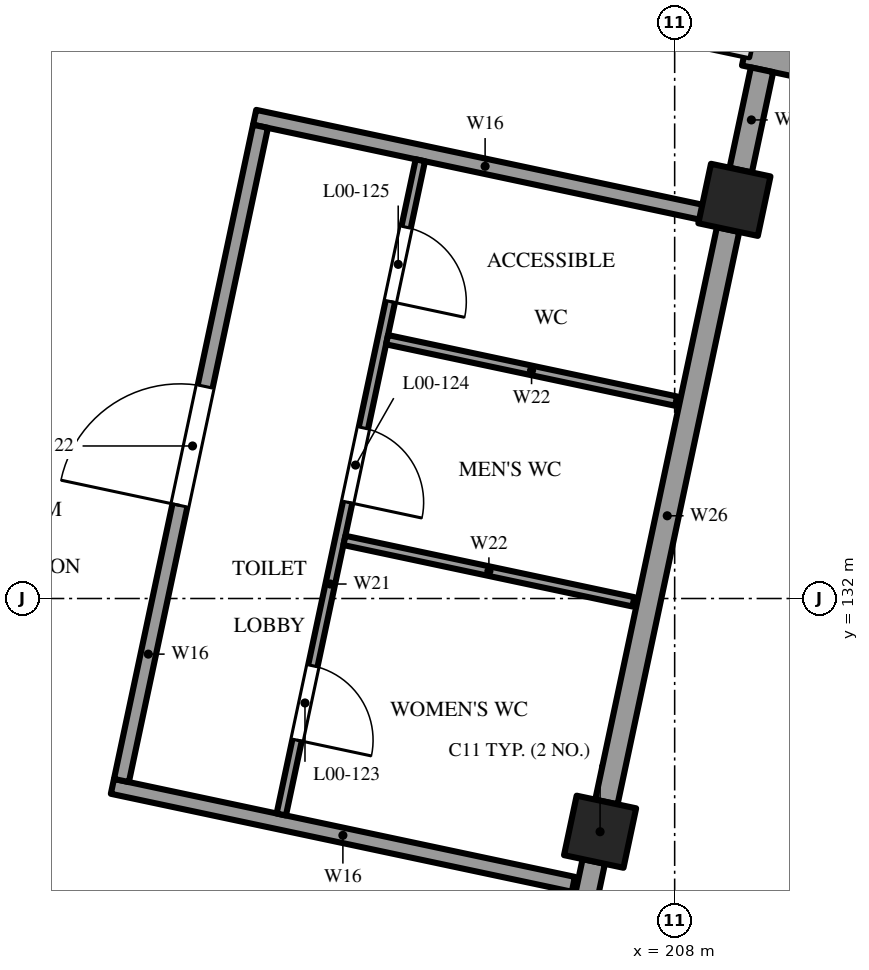
"""IFC4 building model, lengths in metres.
Left out: names, types, materials, properties, quantities, classifications, styles, units other than length and angle.
Written with IfcOpenShell. Run it as: python <this file> out.ifc"""

import sys

from ifc_helpers import new_model, si_unit, direction, frame, frame_2d, origin, origin_2d, place, context, subcontext, project, spatial, rectangle, extrude, element, fill, save


model = new_model("IFC4")
c1 = context("Model", 3, precision=1e-05, world=origin(), true_north=direction((0.0, 1.0)))
c2 = subcontext(c1, "Body", "Model", "MODEL_VIEW")
j1 = project(units=[si_unit("LENGTHUNIT", "METRE"), si_unit("PLANEANGLEUNIT", "RADIAN")], contexts=[c1])
p1 = place(None, origin())
s1 = spatial("IfcSite", under=j1, at=p1, CompositionType="ELEMENT")
p2 = place(p1, origin())
s2 = spatial("IfcBuilding", under=s1, at=p2, CompositionType="ELEMENT")
p3 = place(p2, origin())
s3 = spatial("IfcBuildingStorey", under=s2, at=p3, CompositionType="ELEMENT", Elevation=0.0)
for number, where, z_axis, x_axis in (
    (1, (207.019, 128.931, -0.4), (0.0, 0.0, 1.0), (0.978, -0.208, 0.0)),
    (2, (208.786, 137.246, -0.4), (0.0, 0.0, 1.0), (0.978, -0.208, 0.0)),
):
    element("IfcColumn", number, at=place(p3, frame(where, z_axis=z_axis, x_axis=x_axis)), inside=s3, PredefinedType="COLUMN", context=c2, shape_type="SweptSolid", body=[
        extrude(rectangle(XDim=0.8, YDim=0.8, at=origin_2d()), origin(), (0.0, 0.0, 1.0), 7.6),
    ])
p4 = place(p3, frame((208.927, 139.209, 0.0), z_axis=(0.0, 0.0, 1.0), x_axis=(0.978147350686, -0.207912867197, 0.0)))
e3 = element("IfcWall", 3, at=p4, inside=s3, PredefinedType="SOLIDWALL", context=c2, shape_type="SweptSolid", body=[
    extrude(rectangle(XDim=22.07, YDim=0.4, at=frame_2d((11.035, 0.0))), origin(), (0.0, 0.0, 1.0), 7.2),
])
p5 = place(p4, frame((14.27, 0.0, 0.0)))
e4 = element("IfcOpeningElement", 4, at=p5, cuts=e3, PredefinedType="OPENING", context=c2, shape_type="SweptSolid", body=[
    extrude(rectangle(XDim=2.4, YDim=2.4, at=frame_2d((1.2, 1.2))), frame((0.0, 0.21, 0.0), z_axis=(0.0, -1.0, 0.0), x_axis=(1.0, 0.0, 0.0)), (0.0, 0.0, 1.0), 0.42),
])
p6 = place(p4, frame((2.47, 0.0, 2.2)))
e5 = element("IfcOpeningElement", 5, at=p6, cuts=e3, PredefinedType="OPENING", context=c2, shape_type="SweptSolid", body=[
    extrude(rectangle(XDim=3.0, YDim=4.0, at=frame_2d((1.5, 2.0))), frame((0.0, 0.21, 0.0), z_axis=(0.0, -1.0, 0.0), x_axis=(1.0, 0.0, 0.0)), (0.0, 0.0, 1.0), 0.42),
])
p7 = place(p4, frame((7.47, 0.0, 2.2)))
e6 = element("IfcOpeningElement", 6, at=p7, cuts=e3, PredefinedType="OPENING", context=c2, shape_type="SweptSolid", body=[
    extrude(rectangle(XDim=3.0, YDim=4.0, at=frame_2d((1.5, 2.0))), frame((0.0, 0.21, 0.0), z_axis=(0.0, -1.0, 0.0), x_axis=(1.0, 0.0, 0.0)), (0.0, 0.0, 1.0), 0.42),
])
p8 = place(p4, frame((17.47, 0.0, 2.2)))
e7 = element("IfcOpeningElement", 7, at=p8, cuts=e3, PredefinedType="OPENING", context=c2, shape_type="SweptSolid", body=[
    extrude(rectangle(XDim=3.0, YDim=4.0, at=frame_2d((1.5, 2.0))), frame((0.0, 0.21, 0.0), z_axis=(0.0, -1.0, 0.0), x_axis=(1.0, 0.0, 0.0)), (0.0, 0.0, 1.0), 0.42),
])
p9 = place(p3, frame((205.335, 121.008, 0.0), z_axis=(0.0, 0.0, 1.0), x_axis=(0.207900468663, 0.978149986009, 0.0)))
e8 = element("IfcWall", 8, at=p9, inside=s3, PredefinedType="SOLIDWALL", context=c2, shape_type="SweptSolid", body=[
    extrude(rectangle(XDim=7.7, YDim=0.3, at=frame_2d((3.85, 0.0))), origin(), (0.0, 0.0, 1.0), 7.2),
])
p10 = place(p9, frame((2.65, 0.0, 0.0)))
e9 = element("IfcOpeningElement", 9, at=p10, cuts=e8, PredefinedType="OPENING", context=c2, shape_type="SweptSolid", body=[
    extrude(rectangle(XDim=2.4, YDim=2.4, at=frame_2d((1.2, 1.2))), frame((0.0, 0.16, 0.0), z_axis=(0.0, -1.0, 0.0), x_axis=(1.0, 0.0, 0.0)), (0.0, 0.0, 1.0), 0.32),
])
p11 = place(p3, frame((207.102, 129.323, 0.0), z_axis=(0.0, 0.0, 1.0), x_axis=(0.207930804564, 0.978143537786, 0.0)))
e10 = element("IfcWall", 10, at=p11, inside=s3, PredefinedType="SOLIDWALL", context=c2, shape_type="SweptSolid", body=[
    extrude(rectangle(XDim=7.7, YDim=0.3, at=frame_2d((3.85, 0.0))), origin(), (0.0, 0.0, 1.0), 7.2),
])
p12 = place(p3, frame((208.869, 137.637, 0.0), z_axis=(0.0, 0.0, 1.0), x_axis=(0.207960405185, 0.978137244908, 0.0)))
e11 = element("IfcWall", 11, at=p12, inside=s3, PredefinedType="SOLIDWALL", context=c2, shape_type="SweptSolid", body=[
    extrude(rectangle(XDim=1.35, YDim=0.3, at=frame_2d((0.675, 0.0))), origin(), (0.0, 0.0, 1.0), 7.2),
])
p13 = place(p3, frame((199.605, 141.19, 0.0), z_axis=(0.0, 0.0, 1.0), x_axis=(0.978150512552, -0.207897991319, 0.0)))
e12 = element("IfcWall", 12, at=p13, inside=s3, PredefinedType="SOLIDWALL", context=c2, shape_type="SweptSolid", body=[
    extrude(rectangle(XDim=9.6, YDim=0.15, at=frame_2d((4.8, 0.0))), origin(), (0.0, 0.0, 1.0), 4.5),
])
p14 = place(p13, frame((3.6, 0.0, 0.0)))
e13 = element("IfcOpeningElement", 13, at=p14, cuts=e12, PredefinedType="OPENING", context=c2, shape_type="SweptSolid", body=[
    extrude(rectangle(XDim=2.4, YDim=2.4, at=frame_2d((1.2, 1.2))), frame((0.0, 0.085, 0.0), z_axis=(0.0, -1.0, 0.0), x_axis=(1.0, 0.0, 0.0)), (0.0, 0.0, 1.0), 0.17),
])
p15 = place(p3, frame((200.603, 129.528, 0.0), z_axis=(0.0, 0.0, 1.0), x_axis=(0.978148542041, -0.207907262267, 0.0)))
e14 = element("IfcWall", 14, at=p15, inside=s3, PredefinedType="SOLIDWALL", context=c2, shape_type="SweptSolid", body=[
    extrude(rectangle(XDim=6.2, YDim=0.2, at=frame_2d((3.1, 0.0))), origin(), (0.0, 0.0, 1.0), 4.3),
])
p16 = place(p3, frame((202.474, 138.332, 0.0), z_axis=(0.0, 0.0, 1.0), x_axis=(0.978146839882, -0.207915270313, 0.0)))
e15 = element("IfcWall", 15, at=p16, inside=s3, PredefinedType="SOLIDWALL", context=c2, shape_type="SweptSolid", body=[
    extrude(rectangle(XDim=6.2, YDim=0.2, at=frame_2d((3.1, 0.0))), origin(), (0.0, 0.0, 1.0), 4.3),
])
p17 = place(p3, frame((200.721, 129.605, 0.0), z_axis=(0.0, 0.0, 1.0), x_axis=(0.207908858699, 0.978148202715, 0.0)))
e16 = element("IfcWall", 16, at=p17, inside=s3, PredefinedType="SOLIDWALL", context=c2, shape_type="SweptSolid", body=[
    extrude(rectangle(XDim=8.8, YDim=0.2, at=frame_2d((4.4, 0.0))), origin(), (0.0, 0.0, 1.0), 4.3),
])
p18 = place(p17, frame((3.7, 0.0, 0.0)))
e17 = element("IfcOpeningElement", 17, at=p18, cuts=e16, PredefinedType="OPENING", context=c2, shape_type="SweptSolid", body=[
    extrude(rectangle(XDim=1.6, YDim=2.1, at=frame_2d((0.8, 1.05))), frame((0.0, 0.11, 0.0), z_axis=(0.0, -1.0, 0.0), x_axis=(1.0, 0.0, 0.0)), (0.0, 0.0, 1.0), 0.22),
])
p19 = place(p3, frame((202.824, 129.158, 0.0), z_axis=(0.0, 0.0, 1.0), x_axis=(0.207908858699, 0.978148202715, 0.0)))
e18 = element("IfcWall", 18, at=p19, inside=s3, PredefinedType="PARTITIONING", context=c2, shape_type="SweptSolid", body=[
    extrude(rectangle(XDim=8.8, YDim=0.125, at=frame_2d((4.4, 0.0))), origin(), (0.0, 0.0, 1.0), 4.3),
])
p20 = place(p19, frame((1.0, 0.0, 0.0)))
e19 = element("IfcOpeningElement", 19, at=p20, cuts=e18, PredefinedType="OPENING", context=c2, shape_type="SweptSolid", body=[
    extrude(rectangle(XDim=1.0, YDim=2.1, at=frame_2d((0.5, 1.05))), frame((0.0, 0.073, 0.0), z_axis=(0.0, -1.0, 0.0), x_axis=(1.0, 0.0, 0.0)), (0.0, 0.0, 1.0), 0.145),
])
p21 = place(p19, frame((4.2, 0.0, 0.0)))
e20 = element("IfcOpeningElement", 20, at=p21, cuts=e18, PredefinedType="OPENING", context=c2, shape_type="SweptSolid", body=[
    extrude(rectangle(XDim=1.0, YDim=2.1, at=frame_2d((0.5, 1.05))), frame((0.0, 0.073, 0.0), z_axis=(0.0, -1.0, 0.0), x_axis=(1.0, 0.0, 0.0)), (0.0, 0.0, 1.0), 0.145),
])
p22 = place(p19, frame((6.9, 0.0, 0.0)))
e21 = element("IfcOpeningElement", 21, at=p22, cuts=e18, PredefinedType="OPENING", context=c2, shape_type="SweptSolid", body=[
    extrude(rectangle(XDim=1.0, YDim=2.1, at=frame_2d((0.5, 1.05))), frame((0.0, 0.073, 0.0), z_axis=(0.0, -1.0, 0.0), x_axis=(1.0, 0.0, 0.0)), (0.0, 0.0, 1.0), 0.145),
])
p23 = place(p3, frame((203.655, 132.764, 0.0), z_axis=(0.0, 0.0, 1.0), x_axis=(0.978144803819, -0.207924848834, 0.0)))
e22 = element("IfcWall", 22, at=p23, inside=s3, PredefinedType="PARTITIONING", context=c2, shape_type="SweptSolid", body=[
    extrude(rectangle(XDim=3.888, YDim=0.125, at=frame_2d((1.944, 0.0))), origin(), (0.0, 0.0, 1.0), 4.3),
])
p24 = place(p3, frame((204.216, 135.406, 0.0), z_axis=(0.0, 0.0, 1.0), x_axis=(0.97814208863, -0.207937621538, 0.0)))
e23 = element("IfcWall", 23, at=p24, inside=s3, PredefinedType="PARTITIONING", context=c2, shape_type="SweptSolid", body=[
    extrude(rectangle(XDim=3.887, YDim=0.125, at=frame_2d((1.944, 0.0))), origin(), (0.0, 0.0, 1.0), 4.3),
])
p25 = place(p18, origin())
e24 = element("IfcDoor", 24, at=p25, inside=s3, OperationType="DOUBLE_DOOR_SINGLE_SWING", PredefinedType="DOOR", context=c2, shape_type="SweptSolid", body=[
    extrude(rectangle(XDim=1.6, YDim=2.1, at=frame_2d((0.8, 1.05))), frame((0.0, 0.025, 0.0), z_axis=(0.0, -1.0, 0.0), x_axis=(1.0, 0.0, 0.0)), (0.0, 0.0, 1.0), 0.05),
])
fill(e17, e24)
p26 = place(p20, frame((1.0, 0.0, 0.0), z_axis=(0.0, 0.0, 1.0), x_axis=(-1.0, 0.0, 0.0)))
e25 = element("IfcDoor", 25, at=p26, inside=s3, OperationType="SINGLE_SWING_RIGHT", PredefinedType="DOOR", context=c2, shape_type="SweptSolid", body=[
    extrude(rectangle(XDim=1.0, YDim=2.1, at=frame_2d((0.5, 1.05))), frame((0.0, 0.025, 0.0), z_axis=(0.0, -1.0, 0.0), x_axis=(1.0, 0.0, 0.0)), (0.0, 0.0, 1.0), 0.05),
])
fill(e19, e25)
p27 = place(p21, frame((1.0, 0.0, 0.0), z_axis=(0.0, 0.0, 1.0), x_axis=(-1.0, 0.0, 0.0)))
e26 = element("IfcDoor", 26, at=p27, inside=s3, OperationType="SINGLE_SWING_LEFT", PredefinedType="DOOR", context=c2, shape_type="SweptSolid", body=[
    extrude(rectangle(XDim=1.0, YDim=2.1, at=frame_2d((0.5, 1.05))), frame((0.0, 0.025, 0.0), z_axis=(0.0, -1.0, 0.0), x_axis=(1.0, 0.0, 0.0)), (0.0, 0.0, 1.0), 0.05),
])
fill(e20, e26)
p28 = place(p22, frame((1.0, 0.0, 0.0), z_axis=(0.0, 0.0, 1.0), x_axis=(-1.0, 0.0, 0.0)))
e27 = element("IfcDoor", 27, at=p28, inside=s3, OperationType="SINGLE_SWING_RIGHT", PredefinedType="DOOR", context=c2, shape_type="SweptSolid", body=[
    extrude(rectangle(XDim=1.0, YDim=2.1, at=frame_2d((0.5, 1.05))), frame((0.0, 0.025, 0.0), z_axis=(0.0, -1.0, 0.0), x_axis=(1.0, 0.0, 0.0)), (0.0, 0.0, 1.0), 0.05),
])
fill(e21, e27)
save(model, sys.argv[1])
